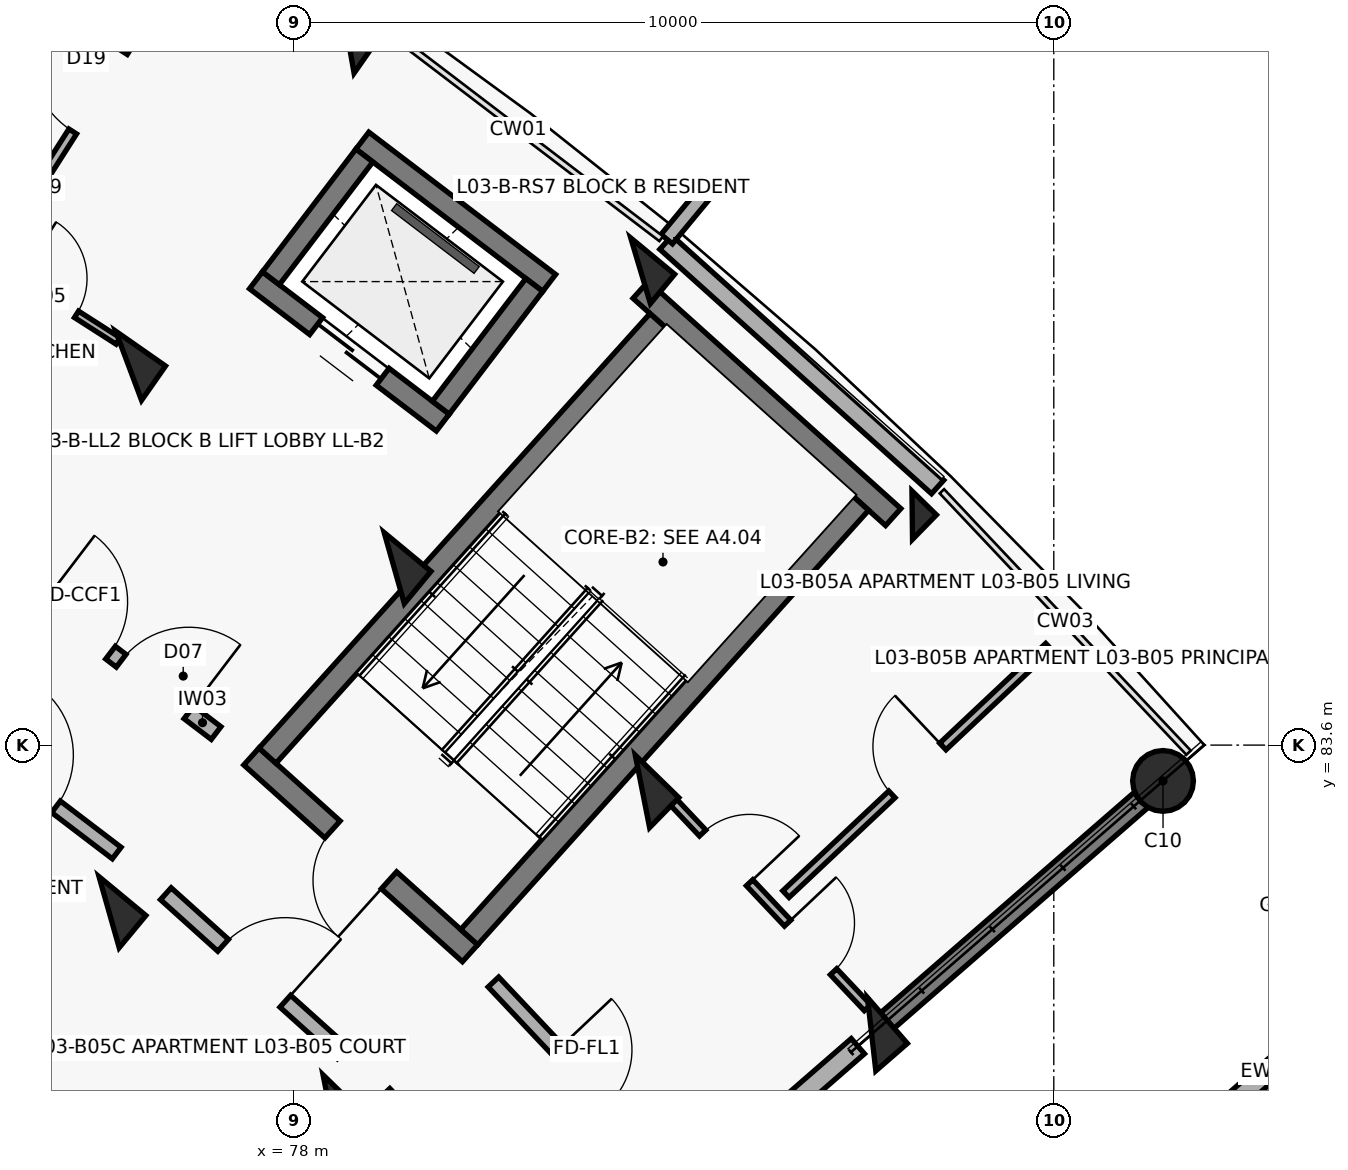
"""IFC4 building model, lengths in metres.
Left out: names, types, materials, properties, quantities, classifications, styles, units other than length and angle.
Written with IfcOpenShell. Run it as: python <this file> out.ifc"""

import sys

from ifc_helpers import new_model, si_unit, direction, frame, frame_2d, origin, origin_2d, place, context, subcontext, project, spatial, rectangle, circle, extrude, element, fill, save


model = new_model("IFC4")
c1 = context("Model", 3, precision=1e-05, world=origin(), true_north=direction((0.0, 1.0)))
c2 = subcontext(c1, "Body", "Model", "MODEL_VIEW")
j1 = project(units=[si_unit("LENGTHUNIT", "METRE"), si_unit("PLANEANGLEUNIT", "RADIAN")], contexts=[c1])
p1 = place(None, origin())
s1 = spatial("IfcSite", under=j1, at=p1, CompositionType="ELEMENT")
p2 = place(p1, origin())
s2 = spatial("IfcBuilding", under=s1, at=p2, CompositionType="ELEMENT")
p3 = place(p2, frame((0.0, 0.0, 11.2)))
s3 = spatial("IfcBuildingStorey", under=s2, at=p3, CompositionType="ELEMENT", Elevation=11.2)
p4 = place(p3, frame((75.828, 88.592, 0.0), z_axis=(0.0, 0.0, 1.0), x_axis=(0.573004420611, 0.819552276527, 0.0)))
e1 = element("IfcColumn", 1, at=p4, inside=s3, PredefinedType="COLUMN", context=c2, shape_type="SweptSolid", body=[
    extrude(rectangle(XDim=0.55, YDim=0.8, at=origin_2d()), origin(), (0.0, 0.0, 1.0), 3.1),
])
p5 = place(p3, frame((78.739, 92.755, 0.0), z_axis=(0.0, 0.0, 1.0), x_axis=(0.573004420611, 0.819552276527, 0.0)))
e2 = element("IfcColumn", 2, at=p5, inside=s3, PredefinedType="COLUMN", context=c2, shape_type="SweptSolid", body=[
    extrude(rectangle(XDim=0.45, YDim=0.45, at=origin_2d()), origin(), (0.0, 0.0, 1.0), 3.1),
])
for number, where, z_axis, x_axis in (
    (3, (75.571, 81.402, 0.0), (0.0, 0.0, 1.0), (0.638, 0.77, 0.0)),
    (4, (79.322, 85.93, 0.0), (0.0, 0.0, 1.0), (0.638, 0.77, 0.0)),
):
    element("IfcColumn", number, at=place(p3, frame(where, z_axis=z_axis, x_axis=x_axis)), inside=s3, PredefinedType="COLUMN", context=c2, shape_type="SweptSolid", body=[
        extrude(rectangle(XDim=0.55, YDim=0.8, at=origin_2d()), origin(), (0.0, 0.0, 1.0), 3.1),
    ])
p6 = place(p3, frame((82.563, 89.842, 0.0), z_axis=(0.0, 0.0, 1.0), x_axis=(0.637961754089, 0.770068049148, 0.0)))
e5 = element("IfcColumn", 5, at=p6, inside=s3, PredefinedType="COLUMN", context=c2, shape_type="SweptSolid", body=[
    extrude(rectangle(XDim=0.5, YDim=0.75, at=origin_2d()), origin(), (0.0, 0.0, 1.0), 3.1),
])
for number, where, z_axis, x_axis in (
    (6, (78.48, 78.784, 0.0), (0.0, 0.0, 1.0), (0.699, 0.715, 0.0)),
    (7, (82.588, 82.991, 0.0), (0.0, 0.0, 1.0), (0.699, 0.715, 0.0)),
):
    element("IfcColumn", number, at=place(p3, frame(where, z_axis=z_axis, x_axis=x_axis)), inside=s3, PredefinedType="COLUMN", context=c2, shape_type="SweptSolid", body=[
        extrude(rectangle(XDim=0.55, YDim=0.8, at=origin_2d()), origin(), (0.0, 0.0, 1.0), 3.1),
    ])
p7 = place(p3, frame((86.137, 86.626, 0.0), z_axis=(0.0, 0.0, 1.0), x_axis=(0.698665066769, 0.715448897181, 0.0)))
e8 = element("IfcColumn", 8, at=p7, inside=s3, PredefinedType="COLUMN", context=c2, shape_type="SweptSolid", body=[
    extrude(rectangle(XDim=0.45, YDim=0.45, at=origin_2d()), origin(), (0.0, 0.0, 1.0), 3.1),
])
p8 = place(p3, frame((85.603, 79.796, 0.0), z_axis=(0.0, 0.0, 1.0), x_axis=(0.754709580223, 0.656059028991, 0.0)))
e9 = element("IfcColumn", 9, at=p8, inside=s3, PredefinedType="COLUMN", context=c2, shape_type="SweptSolid", body=[
    extrude(rectangle(XDim=0.55, YDim=0.8, at=origin_2d()), origin(), (0.0, 0.0, 1.0), 3.1),
])
p9 = place(p3, frame((89.437, 83.129, 0.0), z_axis=(0.0, 0.0, 1.0), x_axis=(0.754709580223, 0.656059028991, 0.0)))
e10 = element("IfcColumn", 10, at=p9, inside=s3, PredefinedType="COLUMN", context=c2, shape_type="SweptSolid", body=[
    extrude(circle(Radius=0.4, at=origin_2d()), origin(), (0.0, 0.0, 1.0), 3.1),
])
p10 = place(p3, frame((85.739, 79.914, 0.0), z_axis=(0.0, 0.0, 1.0), x_axis=(0.754703505217, 0.65606601742, 0.0)))
e11 = element("IfcWall", 11, at=p10, inside=s3, PredefinedType="SHEAR", context=c2, shape_type="SweptSolid", body=[
    extrude(rectangle(XDim=4.72, YDim=0.27, at=frame_2d((2.36, 0.0))), origin(), (0.0, 0.0, 1.0), 2.86),
])
p11 = place(p3, frame((82.897, 90.213, 0.0), z_axis=(0.0, 0.0, 1.0), x_axis=(0.743387539862, -0.668860946369, 0.0)))
e12 = element("IfcWall", 12, at=p11, inside=s3, PredefinedType="SOLIDWALL", context=c2, shape_type="SweptSolid", body=[
    extrude(rectangle(XDim=4.809, YDim=0.24, at=frame_2d((2.405, 0.0))), origin(), (0.0, 0.0, 1.0), 2.25),
])
p12 = place(p3, frame((82.908, 90.257, 0.0), z_axis=(0.0, 0.0, 1.0), x_axis=(0.637967316825, 0.770063440674, 0.0)))
e13 = element("IfcWall", 13, at=p12, inside=s3, PredefinedType="PARAPET", context=c2, shape_type="SweptSolid", body=[
    extrude(rectangle(XDim=0.9, YDim=0.195, at=frame_2d((0.45, 0.0))), origin(), (0.0, 0.0, 1.0), 2.25),
])
p13 = place(p3, frame((79.234, 74.259, 0.0), z_axis=(0.0, 0.0, 1.0), x_axis=(0.754717680958, 0.656049710044, 0.0)))
e14 = element("IfcWall", 14, at=p13, inside=s3, PredefinedType="SOLIDWALL", context=c2, shape_type="SweptSolid", body=[
    extrude(rectangle(XDim=8.2, YDim=0.265, at=frame_2d((4.1, 0.0))), origin(), (0.0, 0.0, 1.0), 2.08),
])
p14 = place(p13, frame((3.59, 0.0, 0.75)))
e15 = element("IfcOpeningElement", 15, at=p14, cuts=e14, PredefinedType="OPENING", context=c2, shape_type="SweptSolid", body=[
    extrude(rectangle(XDim=1.35, YDim=1.35, at=frame_2d((0.675, 0.675))), frame((0.0, 0.142, 0.0), z_axis=(0.0, -1.0, 0.0), x_axis=(1.0, 0.0, 0.0)), (0.0, 0.0, 1.0), 0.285),
])
p15 = place(p3, frame((91.746, 80.101, 0.0), z_axis=(0.0, 0.0, 1.0), x_axis=(-0.754704866158, -0.656064451862, 0.0)))
e16 = element("IfcWall", 16, at=p15, inside=s3, PredefinedType="SOLIDWALL", context=c2, shape_type="SweptSolid", body=[
    extrude(rectangle(XDim=8.2, YDim=0.265, at=frame_2d((4.1, 0.0))), origin(), (0.0, 0.0, 1.0), 2.08),
])
p16 = place(p15, frame((3.59, 0.0, 0.75)))
e17 = element("IfcOpeningElement", 17, at=p16, cuts=e16, PredefinedType="OPENING", context=c2, shape_type="SweptSolid", body=[
    extrude(rectangle(XDim=1.35, YDim=1.35, at=frame_2d((0.675, 0.675))), frame((0.0, 0.142, 0.0), z_axis=(0.0, -1.0, 0.0), x_axis=(1.0, 0.0, 0.0)), (0.0, 0.0, 1.0), 0.285),
])
p17 = place(p3, frame((80.32, 80.862, 0.0), z_axis=(0.0, 0.0, 1.0), x_axis=(-0.743375696158, 0.668874109501, 0.0)))
e18 = element("IfcWall", 18, at=p17, inside=s3, PredefinedType="SHEAR", context=c2, shape_type="SweptSolid", body=[
    extrude(rectangle(XDim=3.87, YDim=0.3, at=frame_2d((1.935, 0.0))), origin(), (0.0, 0.0, 1.0), 3.1),
])
p18 = place(p17, frame((1.435, 0.0, 0.0)))
e19 = element("IfcOpeningElement", 19, at=p18, cuts=e18, PredefinedType="OPENING", context=c2, shape_type="SweptSolid", body=[
    extrude(rectangle(XDim=1.0, YDim=2.15, at=frame_2d((0.5, 1.075))), frame((0.0, 0.16, 0.0), z_axis=(0.0, -1.0, 0.0), x_axis=(1.0, 0.0, 0.0)), (0.0, 0.0, 1.0), 0.32),
])
p19 = place(p3, frame((85.887, 86.601, 0.0), z_axis=(0.0, 0.0, 1.0), x_axis=(-0.743400052815, 0.668847038922, 0.0)))
e20 = element("IfcWall", 20, at=p19, inside=s3, PredefinedType="SHEAR", context=c2, shape_type="SweptSolid", body=[
    extrude(rectangle(XDim=4.47, YDim=0.3, at=frame_2d((2.235, 0.0))), origin(), (0.0, 0.0, 1.0), 3.1),
])
p20 = place(p3, frame((80.309, 81.073, 0.0), z_axis=(0.0, 0.0, 1.0), x_axis=(0.668885797871, 0.743365179038, 0.0)))
e21 = element("IfcWall", 21, at=p20, inside=s3, PredefinedType="SHEAR", context=c2, shape_type="SweptSolid", body=[
    extrude(rectangle(XDim=7.69, YDim=0.3, at=frame_2d((3.845, 0.0))), origin(), (0.0, 0.0, 1.0), 3.1),
])
p21 = place(p3, frame((77.655, 83.461, 0.0), z_axis=(0.0, 0.0, 1.0), x_axis=(0.668868253964, 0.743380964808, 0.0)))
e22 = element("IfcWall", 22, at=p21, inside=s3, PredefinedType="SHEAR", context=c2, shape_type="SweptSolid", body=[
    extrude(rectangle(XDim=7.69, YDim=0.3, at=frame_2d((3.845, 0.0))), origin(), (0.0, 0.0, 1.0), 3.1),
])
p22 = place(p3, frame((79.961, 87.844, 0.0), z_axis=(0.0, 0.0, 1.0), x_axis=(-0.795464365424, 0.606000365793, 0.0)))
e23 = element("IfcWall", 23, at=p22, inside=s3, PredefinedType="SHEAR", context=c2, shape_type="SweptSolid", body=[
    extrude(rectangle(XDim=3.09, YDim=0.28, at=frame_2d((1.545, 0.0))), origin(), (0.0, 0.0, 1.0), 3.1),
])
p23 = place(p22, frame((0.995, 0.0, 0.0)))
e24 = element("IfcOpeningElement", 24, at=p23, cuts=e23, PredefinedType="OPENING", context=c2, shape_type="SweptSolid", body=[
    extrude(rectangle(XDim=1.1, YDim=2.15, at=frame_2d((0.55, 1.075))), frame((0.0, 0.15, 0.0), z_axis=(0.0, -1.0, 0.0), x_axis=(1.0, 0.0, 0.0)), (0.0, 0.0, 1.0), 0.3),
])
p24 = place(p3, frame((81.361, 89.681, 0.0), z_axis=(0.0, 0.0, 1.0), x_axis=(-0.795502452183, 0.605950368076, 0.0)))
e25 = element("IfcWall", 25, at=p24, inside=s3, PredefinedType="SHEAR", context=c2, shape_type="SweptSolid", body=[
    extrude(rectangle(XDim=3.09, YDim=0.28, at=frame_2d((1.545, 0.0))), origin(), (0.0, 0.0, 1.0), 3.1),
])
for number, where, z_axis, x_axis in (
    (26, (79.935, 88.04, 0.0), (0.0, 0.0, 1.0), (0.606, 0.795, 0.0)),
    (27, (77.699, 89.743, 0.0), (0.0, 0.0, 1.0), (0.606, 0.795, 0.0)),
):
    element("IfcWall", number, at=place(p3, frame(where, z_axis=z_axis, x_axis=x_axis)), inside=s3, PredefinedType="SHEAR", context=c2, shape_type="SweptSolid", body=[
        extrude(rectangle(XDim=2.03, YDim=0.28, at=frame_2d((1.015, 0.0))), origin(), (0.0, 0.0, 1.0), 3.1),
    ])
p25 = place(p3, frame((72.481, 90.971, 0.0), z_axis=(0.0, 0.0, 1.0), x_axis=(0.842238809758, -0.53910461632, 0.0)))
e28 = element("IfcWall", 28, at=p25, inside=s3, PredefinedType="PARTITIONING", context=c2, shape_type="SweptSolid", body=[
    extrude(rectangle(XDim=3.81, YDim=0.1, at=frame_2d((1.905, 0.0))), origin(), (0.0, 0.0, 1.0), 2.08),
])
p26 = place(p25, frame((0.65, 0.0, 0.0)))
e29 = element("IfcOpeningElement", 29, at=p26, cuts=e28, PredefinedType="OPENING", context=c2, shape_type="SweptSolid", body=[
    extrude(rectangle(XDim=0.9, YDim=2.1, at=frame_2d((0.45, 1.05))), frame((0.0, 0.06, 0.0), z_axis=(0.0, -1.0, 0.0), x_axis=(1.0, 0.0, 0.0)), (0.0, 0.0, 1.0), 0.12),
])
p27 = place(p25, frame((2.28, 0.0, 0.0)))
e30 = element("IfcOpeningElement", 30, at=p27, cuts=e28, PredefinedType="OPENING", context=c2, shape_type="SweptSolid", body=[
    extrude(rectangle(XDim=0.88, YDim=2.1, at=frame_2d((0.44, 1.05))), frame((0.0, 0.06, 0.0), z_axis=(0.0, -1.0, 0.0), x_axis=(1.0, 0.0, 0.0)), (0.0, 0.0, 1.0), 0.12),
])
p28 = place(p3, frame((74.148, 90.195, 0.0), z_axis=(0.0, 0.0, 1.0), x_axis=(0.537779792606, 0.843085342456, 0.0)))
e31 = element("IfcWall", 31, at=p28, inside=s3, PredefinedType="PARTITIONING", context=c2, shape_type="SweptSolid", body=[
    extrude(rectangle(XDim=4.75, YDim=0.12, at=frame_2d((2.375, 0.0))), origin(), (0.0, 0.0, 1.0), 2.08),
])
p29 = place(p28, frame((1.755, 0.0, 0.0)))
e32 = element("IfcOpeningElement", 32, at=p29, cuts=e31, PredefinedType="OPENING", context=c2, shape_type="SweptSolid", body=[
    extrude(rectangle(XDim=1.24, YDim=2.1, at=frame_2d((0.62, 1.05))), frame((0.0, 0.07, 0.0), z_axis=(0.0, -1.0, 0.0), x_axis=(1.0, 0.0, 0.0)), (0.0, 0.0, 1.0), 0.14),
])
p30 = place(p3, frame((74.357, 85.756, 0.0), z_axis=(0.0, 0.0, 1.0), x_axis=(0.795498026433, -0.605956178235, 0.0)))
e33 = element("IfcWall", 33, at=p30, inside=s3, PredefinedType="SOLIDWALL", context=c2, shape_type="SweptSolid", body=[
    extrude(rectangle(XDim=3.296, YDim=0.21, at=frame_2d((1.648, 0.0))), origin(), (0.0, 0.0, 1.0), 2.08),
])
p31 = place(p30, frame((0.45, 0.0, 0.0)))
e34 = element("IfcOpeningElement", 34, at=p31, cuts=e33, PredefinedType="OPENING", context=c2, shape_type="SweptSolid", body=[
    extrude(rectangle(XDim=1.1, YDim=2.15, at=frame_2d((0.55, 1.075))), frame((0.0, 0.115, 0.0), z_axis=(0.0, -1.0, 0.0), x_axis=(1.0, 0.0, 0.0)), (0.0, 0.0, 1.0), 0.23),
])
p32 = place(p30, frame((1.726, 0.0, 0.0)))
e35 = element("IfcOpeningElement", 35, at=p32, cuts=e33, PredefinedType="OPENING", context=c2, shape_type="SweptSolid", body=[
    extrude(rectangle(XDim=1.12, YDim=2.15, at=frame_2d((0.56, 1.075))), frame((0.0, 0.115, 0.0), z_axis=(0.0, -1.0, 0.0), x_axis=(1.0, 0.0, 0.0)), (0.0, 0.0, 1.0), 0.23),
])
p33 = place(p3, frame((73.182, 84.076, 0.0), z_axis=(0.0, 0.0, 1.0), x_axis=(0.795501577908, -0.605951515838, 0.0)))
e36 = element("IfcWall", 36, at=p33, inside=s3, PredefinedType="SOLIDWALL", context=c2, shape_type="SweptSolid", body=[
    extrude(rectangle(XDim=3.129, YDim=0.19, at=frame_2d((1.564, 0.0))), origin(), (0.0, 0.0, 1.0), 2.08),
])
p34 = place(p33, frame((1.004, 0.0, 0.0)))
e37 = element("IfcOpeningElement", 37, at=p34, cuts=e36, PredefinedType="OPENING", context=c2, shape_type="SweptSolid", body=[
    extrude(rectangle(XDim=1.12, YDim=2.15, at=frame_2d((0.56, 1.075))), frame((0.0, 0.105, 0.0), z_axis=(0.0, -1.0, 0.0), x_axis=(1.0, 0.0, 0.0)), (0.0, 0.0, 1.0), 0.21),
])
p35 = place(p3, frame((76.317, 81.644, 0.0), z_axis=(0.0, 0.0, 1.0), x_axis=(0.743387266925, -0.668861249718, 0.0)))
e38 = element("IfcWall", 38, at=p35, inside=s3, PredefinedType="SOLIDWALL", context=c2, shape_type="SweptSolid", body=[
    extrude(rectangle(XDim=3.128, YDim=0.21, at=frame_2d((1.564, 0.0))), origin(), (0.0, 0.0, 1.0), 2.08),
])
p36 = place(p35, frame((1.014, 0.0, 0.0)))
e39 = element("IfcOpeningElement", 39, at=p36, cuts=e38, PredefinedType="OPENING", context=c2, shape_type="SweptSolid", body=[
    extrude(rectangle(XDim=1.1, YDim=2.15, at=frame_2d((0.55, 1.075))), frame((0.0, 0.115, 0.0), z_axis=(0.0, -1.0, 0.0), x_axis=(1.0, 0.0, 0.0)), (0.0, 0.0, 1.0), 0.23),
])
p37 = place(p3, frame((80.628, 80.483, 0.0), z_axis=(0.0, 0.0, 1.0), x_axis=(0.686310507227, -0.727308660522, 0.0)))
e40 = element("IfcWall", 40, at=p37, inside=s3, PredefinedType="SOLIDWALL", context=c2, shape_type="SweptSolid", body=[
    extrude(rectangle(XDim=3.436, YDim=0.19, at=frame_2d((1.718, 0.0))), origin(), (0.0, 0.0, 1.0), 2.08),
])
p38 = place(p37, frame((1.228, 0.0, 0.0)))
e41 = element("IfcOpeningElement", 41, at=p38, cuts=e40, PredefinedType="OPENING", context=c2, shape_type="SweptSolid", body=[
    extrude(rectangle(XDim=0.98, YDim=2.15, at=frame_2d((0.49, 1.075))), frame((0.0, 0.105, 0.0), z_axis=(0.0, -1.0, 0.0), x_axis=(1.0, 0.0, 0.0)), (0.0, 0.0, 1.0), 0.21),
])
p39 = place(p3, frame((79.195, 79.016, 0.0), z_axis=(0.0, 0.0, 1.0), x_axis=(0.686307658735, -0.727311348434, 0.0)))
e42 = element("IfcWall", 42, at=p39, inside=s3, PredefinedType="SOLIDWALL", context=c2, shape_type="SweptSolid", body=[
    extrude(rectangle(XDim=3.269, YDim=0.19, at=frame_2d((1.634, 0.0))), origin(), (0.0, 0.0, 1.0), 2.08),
])
p40 = place(p39, frame((1.184, 0.0, 0.0)))
e43 = element("IfcOpeningElement", 43, at=p40, cuts=e42, PredefinedType="OPENING", context=c2, shape_type="SweptSolid", body=[
    extrude(rectangle(XDim=0.9, YDim=2.1, at=frame_2d((0.45, 1.05))), frame((0.0, 0.105, 0.0), z_axis=(0.0, -1.0, 0.0), x_axis=(1.0, 0.0, 0.0)), (0.0, 0.0, 1.0), 0.21),
])
p41 = place(p3, frame((82.934, 82.916, 0.0), z_axis=(0.0, 0.0, 1.0), x_axis=(0.686301674417, -0.727316995327, 0.0)))
e44 = element("IfcWall", 44, at=p41, inside=s3, PredefinedType="PARTITIONING", context=c2, shape_type="SweptSolid", body=[
    extrude(rectangle(XDim=3.81, YDim=0.115, at=frame_2d((1.905, 0.0))), origin(), (0.0, 0.0, 1.0), 2.08),
])
p42 = place(p41, frame((0.65, 0.0, 0.0)))
e45 = element("IfcOpeningElement", 45, at=p42, cuts=e44, PredefinedType="OPENING", context=c2, shape_type="SweptSolid", body=[
    extrude(rectangle(XDim=0.9, YDim=2.1, at=frame_2d((0.45, 1.05))), frame((0.0, 0.067, 0.0), z_axis=(0.0, -1.0, 0.0), x_axis=(1.0, 0.0, 0.0)), (0.0, 0.0, 1.0), 0.135),
])
p43 = place(p41, frame((2.28, 0.0, 0.0)))
e46 = element("IfcOpeningElement", 46, at=p43, cuts=e44, PredefinedType="OPENING", context=c2, shape_type="SweptSolid", body=[
    extrude(rectangle(XDim=0.88, YDim=2.1, at=frame_2d((0.44, 1.05))), frame((0.0, 0.067, 0.0), z_axis=(0.0, -1.0, 0.0), x_axis=(1.0, 0.0, 0.0)), (0.0, 0.0, 1.0), 0.135),
])
p44 = place(p3, frame((84.475, 81.639, 0.0), z_axis=(0.0, 0.0, 1.0), x_axis=(0.728314662127, 0.685242842306, 0.0)))
e47 = element("IfcWall", 47, at=p44, inside=s3, PredefinedType="PARTITIONING", context=c2, shape_type="SweptSolid", body=[
    extrude(rectangle(XDim=4.75, YDim=0.12, at=frame_2d((2.375, 0.0))), origin(), (0.0, 0.0, 1.0), 2.08),
])
p45 = place(p44, frame((1.915, 0.0, 0.0)))
e48 = element("IfcOpeningElement", 48, at=p45, cuts=e47, PredefinedType="OPENING", context=c2, shape_type="SweptSolid", body=[
    extrude(rectangle(XDim=0.92, YDim=2.1, at=frame_2d((0.46, 1.05))), frame((0.0, 0.07, 0.0), z_axis=(0.0, -1.0, 0.0), x_axis=(1.0, 0.0, 0.0)), (0.0, 0.0, 1.0), 0.14),
])
p46 = place(p18, origin())
e49 = element("IfcDoor", 49, at=p46, inside=s3, OperationType="SINGLE_SWING_LEFT", PredefinedType="DOOR", context=c2, shape_type="SweptSolid", body=[
    extrude(rectangle(XDim=1.0, YDim=2.15, at=frame_2d((0.5, 1.075))), frame((0.0, 0.025, 0.0), z_axis=(0.0, -1.0, 0.0), x_axis=(1.0, 0.0, 0.0)), (0.0, 0.0, 1.0), 0.05),
])
fill(e19, e49)
p47 = place(p23, origin())
e50 = element("IfcDoor", 50, at=p47, inside=s3, OperationType="DOUBLE_DOOR_SLIDING", PredefinedType="DOOR", context=c2, shape_type="SweptSolid", body=[
    extrude(rectangle(XDim=1.1, YDim=2.15, at=frame_2d((0.55, 1.075))), frame((0.0, 0.025, 0.0), z_axis=(0.0, -1.0, 0.0), x_axis=(1.0, 0.0, 0.0)), (0.0, 0.0, 1.0), 0.05),
])
fill(e24, e50)
p48 = place(p27, origin())
e51 = element("IfcDoor", 51, at=p48, inside=s3, OperationType="SINGLE_SWING_LEFT", PredefinedType="DOOR", context=c2, shape_type="SweptSolid", body=[
    extrude(rectangle(XDim=0.88, YDim=2.1, at=frame_2d((0.44, 1.05))), frame((0.0, 0.025, 0.0), z_axis=(0.0, -1.0, 0.0), x_axis=(1.0, 0.0, 0.0)), (0.0, 0.0, 1.0), 0.05),
])
fill(e30, e51)
p49 = place(p29, origin())
e52 = element("IfcDoor", 52, at=p49, inside=s3, OperationType="SINGLE_SWING_RIGHT", PredefinedType="DOOR", context=c2, shape_type="SweptSolid", body=[
    extrude(rectangle(XDim=1.24, YDim=2.1, at=frame_2d((0.62, 1.05))), frame((0.0, 0.025, 0.0), z_axis=(0.0, -1.0, 0.0), x_axis=(1.0, 0.0, 0.0)), (0.0, 0.0, 1.0), 0.05),
])
fill(e32, e52)
p50 = place(p31, origin())
e53 = element("IfcDoor", 53, at=p50, inside=s3, OperationType="SINGLE_SWING_LEFT", PredefinedType="DOOR", context=c2, shape_type="SweptSolid", body=[
    extrude(rectangle(XDim=1.1, YDim=2.15, at=frame_2d((0.55, 1.075))), frame((0.0, 0.025, 0.0), z_axis=(0.0, -1.0, 0.0), x_axis=(1.0, 0.0, 0.0)), (0.0, 0.0, 1.0), 0.05),
])
fill(e34, e53)
p51 = place(p32, origin())
e54 = element("IfcDoor", 54, at=p51, inside=s3, OperationType="SINGLE_SWING_RIGHT", PredefinedType="DOOR", context=c2, shape_type="SweptSolid", body=[
    extrude(rectangle(XDim=1.12, YDim=2.15, at=frame_2d((0.56, 1.075))), frame((0.0, 0.025, 0.0), z_axis=(0.0, -1.0, 0.0), x_axis=(1.0, 0.0, 0.0)), (0.0, 0.0, 1.0), 0.05),
])
fill(e35, e54)
p52 = place(p34, origin())
e55 = element("IfcDoor", 55, at=p52, inside=s3, OperationType="SINGLE_SWING_LEFT", PredefinedType="DOOR", context=c2, shape_type="SweptSolid", body=[
    extrude(rectangle(XDim=1.12, YDim=2.15, at=frame_2d((0.56, 1.075))), frame((0.0, 0.025, 0.0), z_axis=(0.0, -1.0, 0.0), x_axis=(1.0, 0.0, 0.0)), (0.0, 0.0, 1.0), 0.05),
])
fill(e37, e55)
p53 = place(p36, origin())
e56 = element("IfcDoor", 56, at=p53, inside=s3, OperationType="SINGLE_SWING_RIGHT", PredefinedType="DOOR", context=c2, shape_type="SweptSolid", body=[
    extrude(rectangle(XDim=1.1, YDim=2.15, at=frame_2d((0.55, 1.075))), frame((0.0, 0.025, 0.0), z_axis=(0.0, -1.0, 0.0), x_axis=(1.0, 0.0, 0.0)), (0.0, 0.0, 1.0), 0.05),
])
fill(e39, e56)
p54 = place(p38, origin())
e57 = element("IfcDoor", 57, at=p54, inside=s3, OperationType="SINGLE_SWING_LEFT", PredefinedType="DOOR", context=c2, shape_type="SweptSolid", body=[
    extrude(rectangle(XDim=0.98, YDim=2.15, at=frame_2d((0.49, 1.075))), frame((0.0, 0.025, 0.0), z_axis=(0.0, -1.0, 0.0), x_axis=(1.0, 0.0, 0.0)), (0.0, 0.0, 1.0), 0.05),
])
fill(e41, e57)
p55 = place(p42, origin())
e58 = element("IfcDoor", 58, at=p55, inside=s3, OperationType="SINGLE_SWING_RIGHT", PredefinedType="DOOR", context=c2, shape_type="SweptSolid", body=[
    extrude(rectangle(XDim=0.9, YDim=2.1, at=frame_2d((0.45, 1.05))), frame((0.0, 0.025, 0.0), z_axis=(0.0, -1.0, 0.0), x_axis=(1.0, 0.0, 0.0)), (0.0, 0.0, 1.0), 0.05),
])
fill(e45, e58)
p56 = place(p43, origin())
e59 = element("IfcDoor", 59, at=p56, inside=s3, OperationType="SINGLE_SWING_LEFT", PredefinedType="DOOR", context=c2, shape_type="SweptSolid", body=[
    extrude(rectangle(XDim=0.88, YDim=2.1, at=frame_2d((0.44, 1.05))), frame((0.0, 0.025, 0.0), z_axis=(0.0, -1.0, 0.0), x_axis=(1.0, 0.0, 0.0)), (0.0, 0.0, 1.0), 0.05),
])
fill(e46, e59)
p57 = place(p45, origin())
e60 = element("IfcDoor", 60, at=p57, inside=s3, OperationType="SINGLE_SWING_RIGHT", PredefinedType="DOOR", context=c2, shape_type="SweptSolid", body=[
    extrude(rectangle(XDim=0.92, YDim=2.1, at=frame_2d((0.46, 1.05))), frame((0.0, 0.025, 0.0), z_axis=(0.0, -1.0, 0.0), x_axis=(1.0, 0.0, 0.0)), (0.0, 0.0, 1.0), 0.05),
])
fill(e48, e60)
save(model, sys.argv[1])
